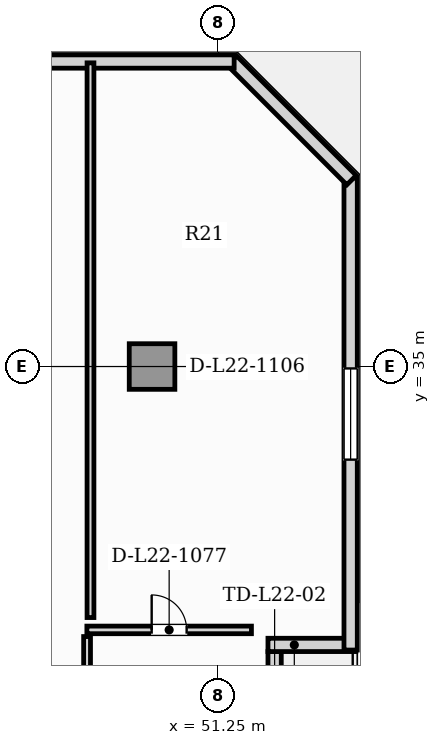
"""IFC4 building model, lengths in metres.
Left out: names, types, materials, properties, quantities, classifications, styles, units other than length and angle.
Written with IfcOpenShell. Run it as: python <this file> out.ifc"""

import sys

from ifc_helpers import new_model, si_unit, direction, frame, frame_2d, origin, origin_2d, place, context, subcontext, project, spatial, rectangle, hollow_rectangle, extrude, element, fill, save


model = new_model("IFC4")
c1 = context("Model", 3, precision=1e-05, world=origin(), true_north=direction((0.0, 1.0)))
c2 = subcontext(c1, "Body", "Model", "MODEL_VIEW")
j1 = project(units=[si_unit("LENGTHUNIT", "METRE"), si_unit("PLANEANGLEUNIT", "RADIAN")], contexts=[c1])
p1 = place(None, origin())
s1 = spatial("IfcSite", under=j1, at=p1, CompositionType="ELEMENT")
p2 = place(p1, origin())
s2 = spatial("IfcBuilding", under=s1, at=p2, CompositionType="ELEMENT")
p3 = place(p2, frame((0.0, 0.0, 92.6)))
s3 = spatial("IfcBuildingStorey", under=s2, at=p3, CompositionType="ELEMENT", Elevation=92.6)
p4 = place(p3, frame((49.5, 35.0, 0.0), z_axis=(0.0, 0.0, 1.0), x_axis=(1.0, 0.0, 0.0)))
e1 = element("IfcColumn", 1, at=p4, inside=s3, PredefinedType="USERDEFINED", context=c2, shape_type="SweptSolid", body=[
    extrude(hollow_rectangle(XDim=1.2, YDim=1.2, WallThickness=0.07, at=origin_2d()), origin(), (0.0, 0.0, 1.0), 3.85),
])
p5 = place(p3, frame((52.725, 24.1, 0.0), z_axis=(0.0, 0.0, 1.0), x_axis=(0.0, 1.0, 0.0)))
e2 = element("IfcWall", 2, at=p5, inside=s3, PredefinedType="SOLIDWALL", context=c2, shape_type="SweptSolid", body=[
    extrude(rectangle(XDim=3.4, YDim=0.35, at=frame_2d((1.7, 0.0))), origin(), (0.0, 0.0, 1.0), 3.6),
])
p6 = place(p5, frame((1.1, 0.0, 0.0)))
e3 = element("IfcOpeningElement", 3, at=p6, cuts=e2, PredefinedType="OPENING", context=c2, shape_type="SweptSolid", body=[
    extrude(rectangle(XDim=1.2, YDim=2.2, at=frame_2d((0.6, 1.1))), frame((0.0, 0.185, 0.0), z_axis=(0.0, -1.0, 0.0), x_axis=(1.0, 0.0, 0.0)), (0.0, 0.0, 1.0), 0.37),
])
p7 = place(p3, frame((52.55, 27.675, 0.0), z_axis=(0.0, 0.0, 1.0), x_axis=(1.0, 0.0, 0.0)))
e4 = element("IfcWall", 4, at=p7, inside=s3, PredefinedType="SOLIDWALL", context=c2, shape_type="SweptSolid", body=[
    extrude(rectangle(XDim=2.31, YDim=0.35, at=frame_2d((1.155, 0.0))), origin(), (0.0, 0.0, 1.0), 3.6),
])
p8 = place(p3, frame((54.725, 27.54, 0.0), z_axis=(0.0, 0.0, 1.0), x_axis=(0.0, 1.0, 0.0)))
e5 = element("IfcWall", 5, at=p8, inside=s3, PredefinedType="SOLIDWALL", context=c2, shape_type="SweptSolid", body=[
    extrude(rectangle(XDim=12.42, YDim=0.35, at=frame_2d((6.21, 0.0))), origin(), (0.0, 0.0, 1.0), 3.6),
])
p9 = place(p8, frame((5.01, 0.0, 0.85)))
e6 = element("IfcOpeningElement", 6, at=p9, cuts=e5, PredefinedType="OPENING", context=c2, shape_type="SweptSolid", body=[
    extrude(rectangle(XDim=2.4, YDim=2.0, at=frame_2d((1.2, 1.0))), frame((0.0, 0.185, 0.0), z_axis=(0.0, -1.0, 0.0), x_axis=(1.0, 0.0, 0.0)), (0.0, 0.0, 1.0), 0.37),
])
p10 = place(p3, frame((54.748, 39.905, 0.0), z_axis=(0.0, 0.0, 1.0), x_axis=(-0.707106781187, 0.707106781187, 0.0)))
e7 = element("IfcWall", 7, at=p10, inside=s3, PredefinedType="SOLIDWALL", context=c2, shape_type="SweptSolid", body=[
    extrude(rectangle(XDim=4.446, YDim=0.35, at=frame_2d((2.223, 0.0))), origin(), (0.0, 0.0, 1.0), 3.6),
])
p11 = place(p3, frame((51.66, 43.025, 0.0), z_axis=(0.0, 0.0, 1.0), x_axis=(-1.0, 0.0, 0.0)))
e8 = element("IfcWall", 8, at=p11, inside=s3, PredefinedType="SOLIDWALL", context=c2, shape_type="SweptSolid", body=[
    extrude(rectangle(XDim=45.82, YDim=0.35, at=frame_2d((22.91, 0.0))), origin(), (0.0, 0.0, 1.0), 3.6),
])
p12 = place(p11, frame((42.65, 0.0, 0.85)))
e9 = element("IfcOpeningElement", 9, at=p12, cuts=e8, PredefinedType="OPENING", context=c2, shape_type="SweptSolid", body=[
    extrude(rectangle(XDim=2.4, YDim=2.0, at=frame_2d((1.2, 1.0))), frame((0.0, 0.185, 0.0), z_axis=(0.0, -1.0, 0.0), x_axis=(1.0, 0.0, 0.0)), (0.0, 0.0, 1.0), 0.37),
])
p13 = place(p11, frame((37.984, 0.0, 0.9)))
e10 = element("IfcOpeningElement", 10, at=p13, cuts=e8, PredefinedType="OPENING", context=c2, shape_type="SweptSolid", body=[
    extrude(rectangle(XDim=0.9, YDim=1.4, at=frame_2d((0.45, 0.7))), frame((0.0, 0.185, 0.0), z_axis=(0.0, -1.0, 0.0), x_axis=(1.0, 0.0, 0.0)), (0.0, 0.0, 1.0), 0.37),
])
p14 = place(p11, frame((32.46, 0.0, 0.9)))
e11 = element("IfcOpeningElement", 11, at=p14, cuts=e8, PredefinedType="OPENING", context=c2, shape_type="SweptSolid", body=[
    extrude(rectangle(XDim=1.5, YDim=1.95, at=frame_2d((0.75, 0.975))), frame((0.0, 0.185, 0.0), z_axis=(0.0, -1.0, 0.0), x_axis=(1.0, 0.0, 0.0)), (0.0, 0.0, 1.0), 0.37),
])
p15 = place(p11, frame((28.245, 0.0, 0.9)))
e12 = element("IfcOpeningElement", 12, at=p15, cuts=e8, PredefinedType="OPENING", context=c2, shape_type="SweptSolid", body=[
    extrude(rectangle(XDim=1.5, YDim=1.95, at=frame_2d((0.75, 0.975))), frame((0.0, 0.185, 0.0), z_axis=(0.0, -1.0, 0.0), x_axis=(1.0, 0.0, 0.0)), (0.0, 0.0, 1.0), 0.37),
])
p16 = place(p11, frame((24.03, 0.0, 0.9)))
e13 = element("IfcOpeningElement", 13, at=p16, cuts=e8, PredefinedType="OPENING", context=c2, shape_type="SweptSolid", body=[
    extrude(rectangle(XDim=1.5, YDim=1.95, at=frame_2d((0.75, 0.975))), frame((0.0, 0.185, 0.0), z_axis=(0.0, -1.0, 0.0), x_axis=(1.0, 0.0, 0.0)), (0.0, 0.0, 1.0), 0.37),
])
p17 = place(p11, frame((19.815, 0.0, 0.9)))
e14 = element("IfcOpeningElement", 14, at=p17, cuts=e8, PredefinedType="OPENING", context=c2, shape_type="SweptSolid", body=[
    extrude(rectangle(XDim=1.5, YDim=1.95, at=frame_2d((0.75, 0.975))), frame((0.0, 0.185, 0.0), z_axis=(0.0, -1.0, 0.0), x_axis=(1.0, 0.0, 0.0)), (0.0, 0.0, 1.0), 0.37),
])
p18 = place(p11, frame((15.6, 0.0, 0.9)))
e15 = element("IfcOpeningElement", 15, at=p18, cuts=e8, PredefinedType="OPENING", context=c2, shape_type="SweptSolid", body=[
    extrude(rectangle(XDim=1.5, YDim=1.95, at=frame_2d((0.75, 0.975))), frame((0.0, 0.185, 0.0), z_axis=(0.0, -1.0, 0.0), x_axis=(1.0, 0.0, 0.0)), (0.0, 0.0, 1.0), 0.37),
])
p19 = place(p11, frame((11.385, 0.0, 0.9)))
e16 = element("IfcOpeningElement", 16, at=p19, cuts=e8, PredefinedType="OPENING", context=c2, shape_type="SweptSolid", body=[
    extrude(rectangle(XDim=1.5, YDim=1.95, at=frame_2d((0.75, 0.975))), frame((0.0, 0.185, 0.0), z_axis=(0.0, -1.0, 0.0), x_axis=(1.0, 0.0, 0.0)), (0.0, 0.0, 1.0), 0.37),
])
p20 = place(p11, frame((7.17, 0.0, 0.9)))
e17 = element("IfcOpeningElement", 17, at=p20, cuts=e8, PredefinedType="OPENING", context=c2, shape_type="SweptSolid", body=[
    extrude(rectangle(XDim=1.5, YDim=1.95, at=frame_2d((0.75, 0.975))), frame((0.0, 0.185, 0.0), z_axis=(0.0, -1.0, 0.0), x_axis=(1.0, 0.0, 0.0)), (0.0, 0.0, 1.0), 0.37),
])
p21 = place(p3, frame((47.79, 13.765, 0.0), z_axis=(0.0, 0.0, 1.0), x_axis=(0.0, 1.0, 0.0)))
e18 = element("IfcWall", 18, at=p21, inside=s3, PredefinedType="PARTITIONING", context=c2, shape_type="SweptSolid", body=[
    extrude(rectangle(XDim=14.13, YDim=0.18, at=frame_2d((7.065, 0.0))), origin(), (0.0, 0.0, 1.0), 3.6),
])
p22 = place(p21, frame((6.565, 0.0, 0.0)))
e19 = element("IfcOpeningElement", 19, at=p22, cuts=e18, PredefinedType="OPENING", context=c2, shape_type="SweptSolid", body=[
    extrude(rectangle(XDim=1.0, YDim=2.15, at=frame_2d((0.5, 1.075))), frame((0.0, 0.1, 0.0), z_axis=(0.0, -1.0, 0.0), x_axis=(1.0, 0.0, 0.0)), (0.0, 0.0, 1.0), 0.2),
])
p23 = place(p3, frame((47.785, 28.07, 0.0), z_axis=(0.0, 0.0, 1.0), x_axis=(1.0, 0.0, 0.0)))
e20 = element("IfcWall", 20, at=p23, inside=s3, PredefinedType="PARTITIONING", context=c2, shape_type="SweptSolid", body=[
    extrude(rectangle(XDim=4.33, YDim=0.2, at=frame_2d((2.165, 0.0))), origin(), (0.0, 0.0, 1.0), 3.6),
])
p24 = place(p23, frame((1.705, 0.0, 0.0)))
e21 = element("IfcOpeningElement", 21, at=p24, cuts=e20, PredefinedType="OPENING", context=c2, shape_type="SweptSolid", body=[
    extrude(rectangle(XDim=0.92, YDim=2.1, at=frame_2d((0.46, 1.05))), frame((0.0, 0.11, 0.0), z_axis=(0.0, -1.0, 0.0), x_axis=(1.0, 0.0, 0.0)), (0.0, 0.0, 1.0), 0.22),
])
p25 = place(p3, frame((47.88, 28.395, 0.0), z_axis=(0.0, 0.0, 1.0), x_axis=(0.0, 1.0, 0.0)))
e22 = element("IfcWall", 22, at=p25, inside=s3, PredefinedType="PARTITIONING", context=c2, shape_type="SweptSolid", body=[
    extrude(rectangle(XDim=14.595, YDim=0.18, at=frame_2d((7.297, 0.0))), origin(), (0.0, 0.0, 1.0), 3.6),
])
p26 = place(p9, origin())
e23 = element("IfcWindow", 23, at=p26, inside=s3, PartitioningType="SINGLE_PANEL", PredefinedType="WINDOW", context=c2, shape_type="SweptSolid", body=[
    extrude(rectangle(XDim=2.4, YDim=2.0, at=frame_2d((1.2, 1.0))), frame((0.0, 0.03, 0.0), z_axis=(0.0, -1.0, 0.0), x_axis=(1.0, 0.0, 0.0)), (0.0, 0.0, 1.0), 0.06),
])
fill(e6, e23)
p27 = place(p24, origin())
e24 = element("IfcDoor", 24, at=p27, inside=s3, OperationType="SINGLE_SWING_LEFT", PredefinedType="DOOR", context=c2, shape_type="SweptSolid", body=[
    extrude(rectangle(XDim=0.92, YDim=2.1, at=frame_2d((0.46, 1.05))), frame((0.0, 0.025, 0.0), z_axis=(0.0, -1.0, 0.0), x_axis=(1.0, 0.0, 0.0)), (0.0, 0.0, 1.0), 0.05),
])
fill(e21, e24)
save(model, sys.argv[1])
